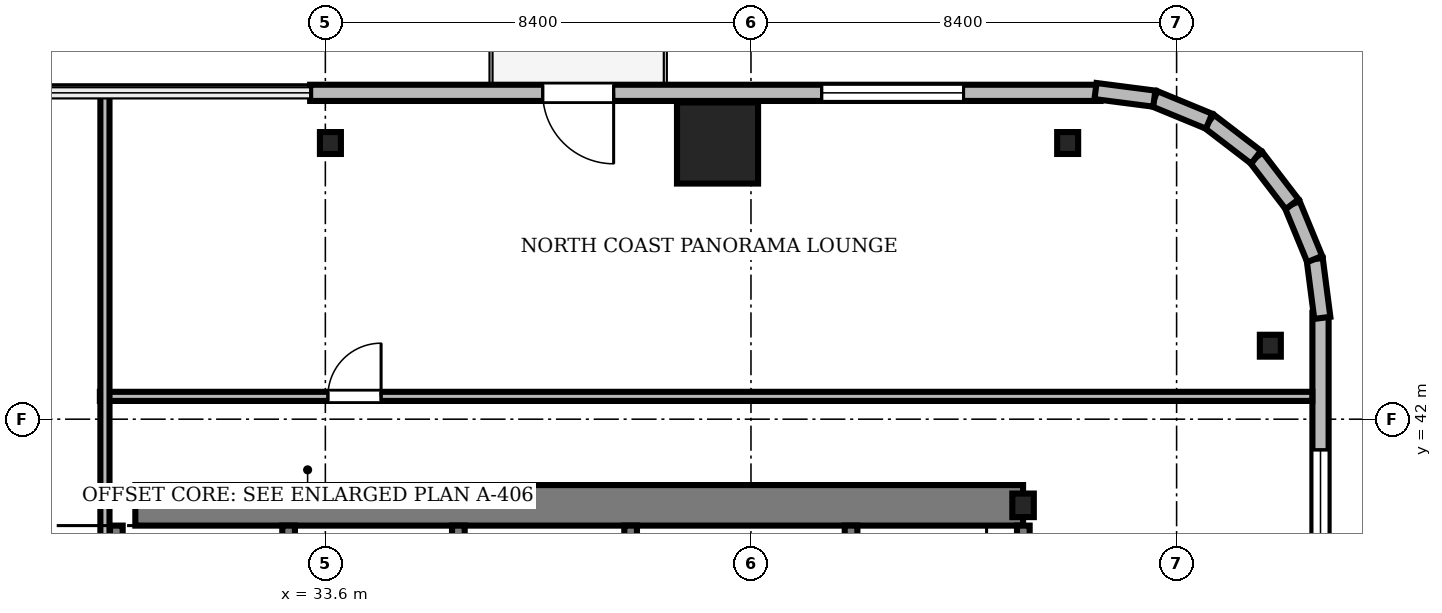
"""IFC4 building model, lengths in metres.
Left out: names, types, materials, properties, quantities, classifications, styles, units other than length and angle.
Written with IfcOpenShell. Run it as: python <this file> out.ifc"""

import sys

from ifc_helpers import new_model, si_unit, direction, frame, frame_2d, origin, origin_2d, place, context, subcontext, project, spatial, rectangle, i_section, extrude, source, transform, mapped, element, fill, save


model = new_model("IFC4")
c1 = context("Model", 3, precision=1e-05, world=origin(), true_north=direction((0.0, 1.0)))
c2 = subcontext(c1, "Body", "Model", "MODEL_VIEW")
j1 = project(units=[si_unit("LENGTHUNIT", "METRE"), si_unit("PLANEANGLEUNIT", "RADIAN")], contexts=[c1])
p1 = place(None, origin())
s1 = spatial("IfcSite", under=j1, at=p1, CompositionType="ELEMENT")
p2 = place(p1, origin())
s2 = spatial("IfcBuilding", under=s1, at=p2, CompositionType="ELEMENT")
p3 = place(p2, frame((0.0, 0.0, 111.3)))
s3 = spatial("IfcBuildingStorey", under=s2, at=p3, CompositionType="ELEMENT", Elevation=111.3)
m1 = source(origin(), c2, "Body", "SweptSolid", [
    extrude(rectangle(XDim=17.52, YDim=0.8, at=frame_2d((8.76, 0.0))), origin(), (0.0, 0.0, 1.0), 3.46),
])
p4 = place(p3, frame((29.85, 40.3, 0.0), z_axis=(0.0, 0.0, 1.0), x_axis=(1.0, 0.0, 0.0)))
e1 = element("IfcWall", 1, at=p4, inside=s3, PredefinedType="SHEAR", context=c2, shape_type="MappedRepresentation", body=[
    mapped(m1, transform((0.0, 0.0, 0.0), scale=1.0)),
])
m2 = source(origin(), c2, "Body", "SweptSolid", [
    extrude(i_section(OverallWidth=0.424, OverallDepth=0.465, WebThickness=0.035, FlangeThickness=0.056, FilletRadius=0.015, at=origin_2d()), origin(), (0.0, 0.0, 1.0), 3.46),
])
p5 = place(p3, frame((47.37, 40.3, 0.0), z_axis=(0.0, 0.0, 1.0), x_axis=(1.0, 0.0, 0.0)))
e2 = element("IfcColumn", 2, at=p5, inside=s3, PredefinedType="COLUMN", context=c2, shape_type="MappedRepresentation", body=[
    mapped(m2, transform((0.0, 0.0, 0.0), scale=1.0)),
])
m3 = source(origin(), c2, "Body", "SweptSolid", [
    extrude(rectangle(XDim=1.6, YDim=1.6, at=origin_2d()), origin(), (0.0, 0.0, 1.0), 3.46),
])
p6 = place(p3, frame((41.34, 47.45, 0.0), z_axis=(0.0, 0.0, 1.0), x_axis=(1.0, 0.0, 0.0)))
e3 = element("IfcColumn", 3, at=p6, inside=s3, PredefinedType="COLUMN", context=c2, shape_type="MappedRepresentation", body=[
    mapped(m3, transform((0.0, 0.0, 0.0), scale=1.0)),
])
m4 = source(origin(), c2, "Body", "SweptSolid", [
    extrude(i_section(OverallWidth=0.414, OverallDepth=0.432, WebThickness=0.026, FlangeThickness=0.04, FilletRadius=0.015, at=origin_2d()), origin(), (0.0, 0.0, 1.0), 3.46),
])
for number, where, z_axis, x_axis in (
    (4, (52.25, 43.45, 0.0), (0.0, 0.0, 1.0), (1.0, 0.0, 0.0)),
    (5, (48.25, 47.45, 0.0), (0.0, 0.0, 1.0), (1.0, 0.0, 0.0)),
    (6, (33.7, 47.45, 0.0), (0.0, 0.0, 1.0), (1.0, 0.0, 0.0)),
):
    element("IfcColumn", number, at=place(p3, frame(where, z_axis=z_axis, x_axis=x_axis)), inside=s3, PredefinedType="COLUMN", context=c2, shape_type="MappedRepresentation", body=[
        mapped(m4, transform((0.0, 0.0, 0.0), scale=1.0)),
    ])
m5 = source(origin(), c2, "Body", "SweptSolid", [
    extrude(rectangle(XDim=15.6, YDim=0.32, at=frame_2d((7.8, 0.0))), origin(), (0.0, 0.0, 1.0), 3.46),
])
p7 = place(p3, frame((48.9, 48.44, 0.0), z_axis=(0.0, 0.0, 1.0), x_axis=(-1.0, 0.0, 0.0)))
e7 = element("IfcWall", 7, at=p7, inside=s3, PredefinedType="SOLIDWALL", context=c2, shape_type="MappedRepresentation", body=[
    mapped(m5, transform((0.0, 0.0, 0.0), scale=1.0)),
])
m6 = source(origin(), c2, "Body", "SweptSolid", [
    extrude(rectangle(XDim=1.4, YDim=2.3, at=frame_2d((0.7, 1.15))), frame((0.0, 0.17, 0.0), z_axis=(0.0, -1.0, 0.0), x_axis=(1.0, 0.0, 0.0)), (0.0, 0.0, 1.0), 0.34),
])
p8 = place(p7, frame((9.61, 0.0, 0.0)))
e8 = element("IfcOpeningElement", 8, at=p8, cuts=e7, PredefinedType="OPENING", context=c2, shape_type="MappedRepresentation", body=[
    mapped(m6, transform((0.0, 0.0, 0.0), scale=1.0)),
])
m7 = source(origin(), c2, "Body", "SweptSolid", [
    extrude(rectangle(XDim=2.8, YDim=2.4, at=frame_2d((1.4, 1.2))), frame((0.0, 0.17, 0.0), z_axis=(0.0, -1.0, 0.0), x_axis=(1.0, 0.0, 0.0)), (0.0, 0.0, 1.0), 0.34),
])
p9 = place(p7, frame((2.705, 0.0, 0.72)))
e9 = element("IfcOpeningElement", 9, at=p9, cuts=e7, PredefinedType="OPENING", context=c2, shape_type="MappedRepresentation", body=[
    mapped(m7, transform((0.0, 0.0, 0.0), scale=1.0)),
])
m8 = source(origin(), c2, "Body", "SweptSolid", [
    extrude(rectangle(XDim=15.6, YDim=0.32, at=frame_2d((7.8, 0.0))), origin(), (0.0, 0.0, 1.0), 3.46),
])
p10 = place(p3, frame((53.24, 28.5, 0.0), z_axis=(0.0, 0.0, 1.0), x_axis=(0.0, 1.0, 0.0)))
e10 = element("IfcWall", 10, at=p10, inside=s3, PredefinedType="SOLIDWALL", context=c2, shape_type="MappedRepresentation", body=[
    mapped(m8, transform((0.0, 0.0, 0.0), scale=1.0)),
])
p11 = place(p10, frame((10.095, 0.0, 0.72)))
e11 = element("IfcOpeningElement", 11, at=p11, cuts=e10, PredefinedType="OPENING", context=c2, shape_type="MappedRepresentation", body=[
    mapped(m7, transform((0.0, 0.0, 0.0), scale=1.0)),
])
m9 = source(origin(), c2, "Body", "SweptSolid", [
    extrude(rectangle(XDim=1.17, YDim=0.32, at=frame_2d((0.585, 0.0))), origin(), (0.0, 0.0, 1.0), 3.46),
])
p12 = place(p3, frame((53.276, 44.0, 0.0), z_axis=(0.0, 0.0, 1.0), x_axis=(-0.128295670475, 0.991735963317, 0.0)))
e12 = element("IfcWall", 12, at=p12, inside=s3, PredefinedType="SOLIDWALL", context=c2, shape_type="MappedRepresentation", body=[
    mapped(m9, transform((0.0, 0.0, 0.0), scale=1.0)),
])
m10 = source(origin(), c2, "Body", "SweptSolid", [
    extrude(rectangle(XDim=1.169, YDim=0.32, at=frame_2d((0.584, 0.0))), origin(), (0.0, 0.0, 1.0), 3.46),
])
p13 = place(p3, frame((53.125, 45.16, 0.0), z_axis=(0.0, 0.0, 1.0), x_axis=(-0.381054331552, 0.924552646638, 0.0)))
e13 = element("IfcWall", 13, at=p13, inside=s3, PredefinedType="SOLIDWALL", context=c2, shape_type="MappedRepresentation", body=[
    mapped(m10, transform((0.0, 0.0, 0.0), scale=1.0)),
])
m11 = source(origin(), c2, "Body", "SweptSolid", [
    extrude(rectangle(XDim=1.169, YDim=0.32, at=frame_2d((0.584, 0.0))), origin(), (0.0, 0.0, 1.0), 3.46),
])
p14 = place(p3, frame((52.68, 46.241, 0.0), z_axis=(0.0, 0.0, 1.0), x_axis=(-0.608387696831, 0.793639975269, 0.0)))
e14 = element("IfcWall", 14, at=p14, inside=s3, PredefinedType="SOLIDWALL", context=c2, shape_type="MappedRepresentation", body=[
    mapped(m11, transform((0.0, 0.0, 0.0), scale=1.0)),
])
m12 = source(origin(), c2, "Body", "SweptSolid", [
    extrude(rectangle(XDim=1.169, YDim=0.32, at=frame_2d((0.584, 0.0))), origin(), (0.0, 0.0, 1.0), 3.46),
])
p15 = place(p3, frame((51.969, 47.169, 0.0), z_axis=(0.0, 0.0, 1.0), x_axis=(-0.793663520347, 0.608356981114, 0.0)))
e15 = element("IfcWall", 15, at=p15, inside=s3, PredefinedType="SOLIDWALL", context=c2, shape_type="MappedRepresentation", body=[
    mapped(m12, transform((0.0, 0.0, 0.0), scale=1.0)),
])
p16 = place(p3, frame((51.041, 47.88, 0.0), z_axis=(0.0, 0.0, 1.0), x_axis=(-0.924552646638, 0.381054331552, 0.0)))
e16 = element("IfcWall", 16, at=p16, inside=s3, PredefinedType="SOLIDWALL", context=c2, shape_type="MappedRepresentation", body=[
    mapped(m10, transform((0.0, 0.0, 0.0), scale=1.0)),
])
p17 = place(p3, frame((49.96, 48.325, 0.0), z_axis=(0.0, 0.0, 1.0), x_axis=(-0.991735963317, 0.128295670475, 0.0)))
e17 = element("IfcWall", 17, at=p17, inside=s3, PredefinedType="SOLIDWALL", context=c2, shape_type="MappedRepresentation", body=[
    mapped(m9, transform((0.0, 0.0, 0.0), scale=1.0)),
])
m13 = source(origin(), c2, "Body", "SweptSolid", [
    extrude(rectangle(XDim=9.25, YDim=0.25, at=frame_2d((4.625, 0.0))), origin(), (0.0, 0.0, 1.0), 3.5),
])
for number, where, z_axis, x_axis in (
    (18, (29.475, 30.65, 0.0), (0.0, 0.0, 1.0), (0.0, 1.0, 0.0)),
    (19, (32.875, 30.65, 0.0), (0.0, 0.0, 1.0), (0.0, 1.0, 0.0)),
    (20, (36.225, 30.65, 0.0), (0.0, 0.0, 1.0), (0.0, 1.0, 0.0)),
    (21, (39.625, 30.65, 0.0), (0.0, 0.0, 1.0), (0.0, 1.0, 0.0)),
    (22, (43.975, 30.65, 0.0), (0.0, 0.0, 1.0), (0.0, 1.0, 0.0)),
    (23, (47.375, 30.65, 0.0), (0.0, 0.0, 1.0), (0.0, 1.0, 0.0)),
):
    element("IfcWall", number, at=place(p3, frame(where, z_axis=z_axis, x_axis=x_axis)), inside=s3, PredefinedType="SOLIDWALL", context=c2, shape_type="MappedRepresentation", body=[
        mapped(m13, transform((0.0, 0.0, 0.0), scale=1.0)),
    ])
m14 = source(origin(), c2, "Body", "SweptSolid", [
    extrude(rectangle(XDim=23.928, YDim=0.18, at=frame_2d((11.964, 0.0))), origin(), (0.0, 0.0, 1.0), 2.702),
])
p18 = place(p3, frame((29.15, 42.45, 0.0), z_axis=(0.0, 0.0, 1.0), x_axis=(1.0, 0.0, 0.0)))
e24 = element("IfcWall", 24, at=p18, inside=s3, PredefinedType="PARTITIONING", context=c2, shape_type="MappedRepresentation", body=[
    mapped(m14, transform((0.0, 0.0, 0.0), scale=1.0)),
])
m15 = source(origin(), c2, "Body", "SweptSolid", [
    extrude(rectangle(XDim=1.05, YDim=2.2, at=frame_2d((0.525, 1.1))), frame((0.0, 0.1, 0.0), z_axis=(0.0, -1.0, 0.0), x_axis=(1.0, 0.0, 0.0)), (0.0, 0.0, 1.0), 0.2),
])
p19 = place(p18, frame((4.5, 0.0, 0.0)))
e25 = element("IfcOpeningElement", 25, at=p19, cuts=e24, PredefinedType="OPENING", context=c2, shape_type="MappedRepresentation", body=[
    mapped(m15, transform((0.0, 0.0, 0.0), scale=1.0)),
])
m16 = source(origin(), c2, "Body", "SweptSolid", [
    extrude(rectangle(XDim=11.45, YDim=0.18, at=frame_2d((5.725, 0.0))), origin(), (0.0, 0.0, 1.0), 2.702),
])
p20 = place(p3, frame((29.25, 37.02, 0.0), z_axis=(0.0, 0.0, 1.0), x_axis=(0.0, 1.0, 0.0)))
e26 = element("IfcWall", 26, at=p20, inside=s3, PredefinedType="PARTITIONING", context=c2, shape_type="MappedRepresentation", body=[
    mapped(m16, transform((0.0, 0.0, 0.0), scale=1.0)),
])
m17 = source(origin(), c2, "Body", "SweptSolid", [
    extrude(rectangle(XDim=1.4, YDim=2.3, at=frame_2d((0.7, 1.15))), frame((0.0, 0.025, 0.0), z_axis=(0.0, -1.0, 0.0), x_axis=(1.0, 0.0, 0.0)), (0.0, 0.0, 1.0), 0.05),
])
p21 = place(p8, frame((1.4, 0.0, 0.0), z_axis=(0.0, 0.0, 1.0), x_axis=(-1.0, 0.0, 0.0)))
e27 = element("IfcDoor", 27, at=p21, inside=s3, OperationType="DOUBLE_DOOR_SLIDING", PredefinedType="DOOR", context=c2, shape_type="MappedRepresentation", body=[
    mapped(m17, transform((0.0, 0.0, 0.0), scale=1.0)),
])
fill(e8, e27)
m18 = source(origin(), c2, "Body", "SweptSolid", [
    extrude(rectangle(XDim=2.8, YDim=2.4, at=frame_2d((1.4, 1.2))), frame((0.0, 0.03, 0.0), z_axis=(0.0, -1.0, 0.0), x_axis=(1.0, 0.0, 0.0)), (0.0, 0.0, 1.0), 0.06),
])
p22 = place(p9, origin())
e28 = element("IfcWindow", 28, at=p22, inside=s3, PartitioningType="SINGLE_PANEL", PredefinedType="WINDOW", context=c2, shape_type="MappedRepresentation", body=[
    mapped(m18, transform((0.0, 0.0, 0.0), scale=1.0)),
])
fill(e9, e28)
p23 = place(p11, origin())
e29 = element("IfcWindow", 29, at=p23, inside=s3, PartitioningType="SINGLE_PANEL", PredefinedType="WINDOW", context=c2, shape_type="MappedRepresentation", body=[
    mapped(m18, transform((0.0, 0.0, 0.0), scale=1.0)),
])
fill(e11, e29)
m19 = source(origin(), c2, "Body", "SweptSolid", [
    extrude(rectangle(XDim=1.05, YDim=2.2, at=frame_2d((0.525, 1.1))), frame((0.0, 0.025, 0.0), z_axis=(0.0, -1.0, 0.0), x_axis=(1.0, 0.0, 0.0)), (0.0, 0.0, 1.0), 0.05),
])
p24 = place(p19, origin())
e30 = element("IfcDoor", 30, at=p24, inside=s3, OperationType="SINGLE_SWING_RIGHT", PredefinedType="DOOR", context=c2, shape_type="MappedRepresentation", body=[
    mapped(m19, transform((0.0, 0.0, 0.0), scale=1.0)),
])
fill(e25, e30)
save(model, sys.argv[1])
